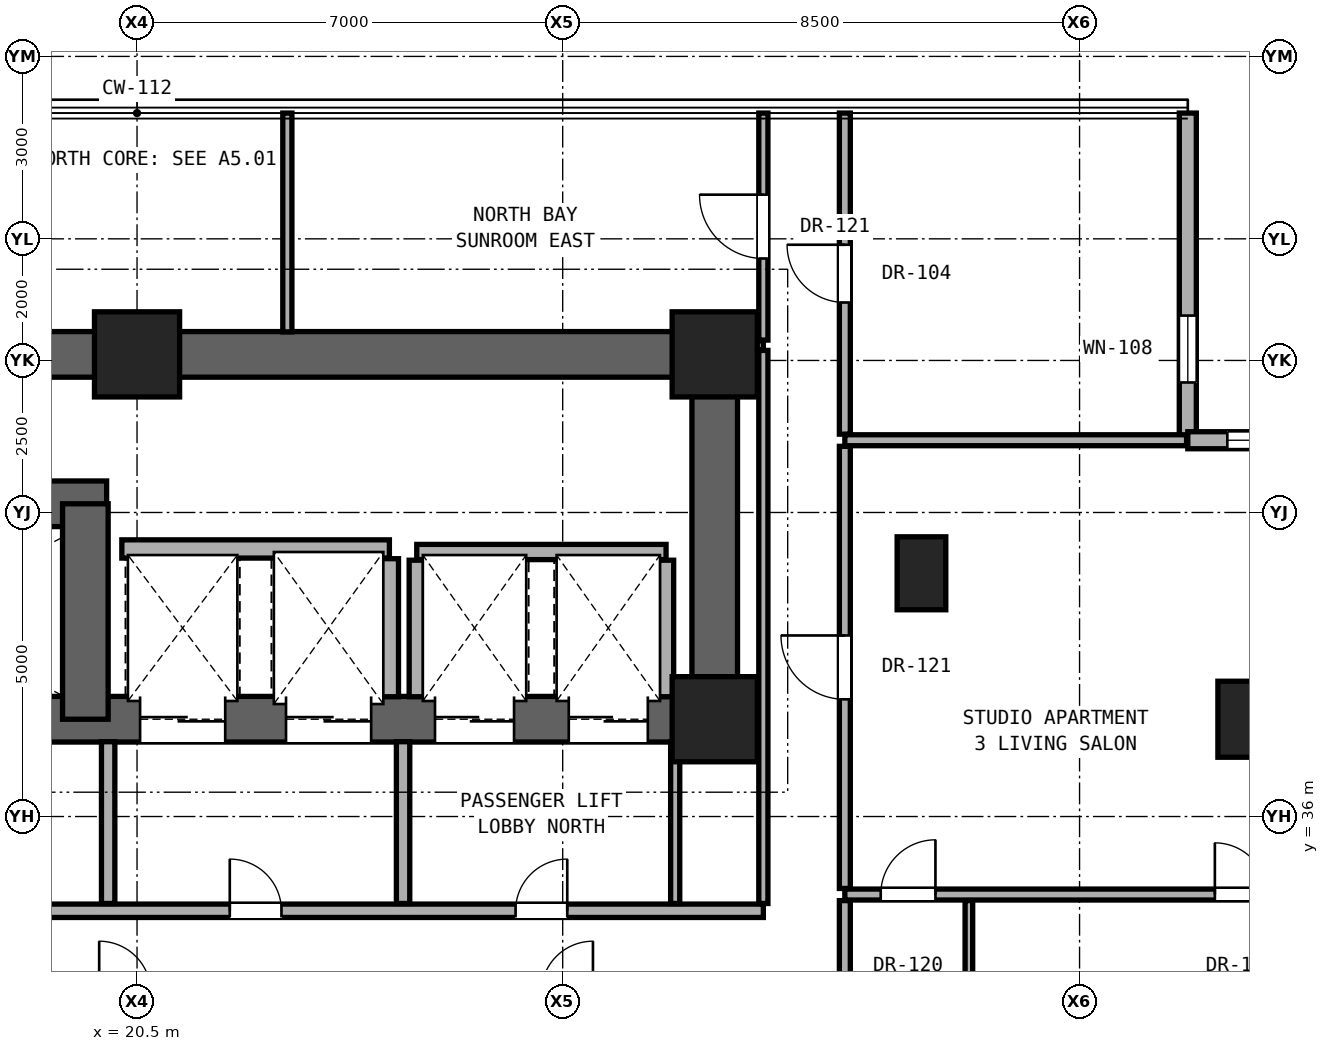
"""IFC4 building model, lengths in metres.
Left out: names, types, materials, properties, quantities, classifications, styles, units other than length and angle.
Written with IfcOpenShell. Run it as: python <this file> out.ifc"""

import sys

from ifc_helpers import new_model, si_unit, direction, frame, frame_2d, origin, origin_2d, place, context, subcontext, project, spatial, rectangle, hollow_rectangle, extrude, element, fill, save


model = new_model("IFC4")
c1 = context("Model", 3, precision=1e-05, world=origin(), true_north=direction((0.0, 1.0)))
c2 = subcontext(c1, "Body", "Model", "MODEL_VIEW")
j1 = project(units=[si_unit("LENGTHUNIT", "METRE"), si_unit("PLANEANGLEUNIT", "RADIAN")], contexts=[c1])
p1 = place(None, origin())
s1 = spatial("IfcSite", under=j1, at=p1, CompositionType="ELEMENT")
p2 = place(p1, origin())
s2 = spatial("IfcBuilding", under=s1, at=p2, CompositionType="ELEMENT")
p3 = place(p2, frame((0.0, 0.0, 42.2)))
s3 = spatial("IfcBuildingStorey", under=s2, at=p3, CompositionType="ELEMENT", Elevation=42.2)
for number, where, z_axis, x_axis in (
    (1, (30.0, 37.6, 0.0), (0.0, 0.0, 1.0), (1.0, 0.0, 0.0)),
    (2, (20.5, 43.6, 0.0), (0.0, 0.0, 1.0), (1.0, 0.0, 0.0)),
    (3, (30.0, 43.6, 0.0), (0.0, 0.0, 1.0), (1.0, 0.0, 0.0)),
):
    element("IfcColumn", number, at=place(p3, frame(where, z_axis=z_axis, x_axis=x_axis)), inside=s3, PredefinedType="COLUMN", context=c2, shape_type="SweptSolid", body=[
        extrude(rectangle(XDim=1.4, YDim=1.4, at=origin_2d()), origin(), (0.0, 0.0, 1.0), 3.3),
    ])
p4 = place(p3, frame((38.9, 37.6, 0.0), z_axis=(0.0, 0.0, 1.0), x_axis=(1.0, 0.0, 0.0)))
e4 = element("IfcColumn", 4, at=p4, inside=s3, PredefinedType="COLUMN", context=c2, shape_type="SweptSolid", body=[
    extrude(hollow_rectangle(XDim=1.25, YDim=1.25, WallThickness=0.07, at=origin_2d()), origin(), (0.0, 0.0, 1.0), 3.3),
])
p5 = place(p3, frame((33.4, 40.0, 0.0), z_axis=(0.0, 0.0, 1.0), x_axis=(1.0, 0.0, 0.0)))
e5 = element("IfcColumn", 5, at=p5, inside=s3, PredefinedType="PILASTER", context=c2, shape_type="SweptSolid", body=[
    extrude(rectangle(XDim=0.8, YDim=1.2, at=origin_2d()), origin(), (0.0, 0.0, 1.0), 3.3),
])
p6 = place(p3, frame((11.0, 43.6, 0.0), z_axis=(0.0, 0.0, 1.0), x_axis=(1.0, 0.0, 0.0)))
e6 = element("IfcWall", 6, at=p6, inside=s3, PredefinedType="SHEAR", context=c2, shape_type="SweptSolid", body=[
    extrude(rectangle(XDim=19.0, YDim=0.75, at=frame_2d((9.5, 0.0))), origin(), (0.0, 0.0, 1.0), 3.06),
])
p7 = place(p3, frame((30.0, 37.6, 0.0), z_axis=(0.0, 0.0, 1.0), x_axis=(0.0, 1.0, 0.0)))
e7 = element("IfcWall", 7, at=p7, inside=s3, PredefinedType="SHEAR", context=c2, shape_type="SweptSolid", body=[
    extrude(rectangle(XDim=6.0, YDim=0.75, at=frame_2d((3.0, 0.0))), origin(), (0.0, 0.0, 1.0), 3.06),
])
p8 = place(p3, frame((11.0, 37.6, 0.0), z_axis=(0.0, 0.0, 1.0), x_axis=(1.0, 0.0, 0.0)))
e8 = element("IfcWall", 8, at=p8, inside=s3, PredefinedType="SHEAR", context=c2, shape_type="SweptSolid", body=[
    extrude(rectangle(XDim=19.0, YDim=0.75, at=frame_2d((9.5, 0.0))), origin(), (0.0, 0.0, 1.0), 3.06),
])
p9 = place(p8, frame((1.06, 0.0, 0.0)))
e9 = element("IfcOpeningElement", 9, at=p9, cuts=e8, PredefinedType="OPENING", context=c2, shape_type="SweptSolid", body=[
    extrude(rectangle(XDim=1.15, YDim=2.2, at=frame_2d((0.575, 1.1))), frame((0.0, 0.385, 0.0), z_axis=(0.0, -1.0, 0.0), x_axis=(1.0, 0.0, 0.0)), (0.0, 0.0, 1.0), 0.77),
])
p10 = place(p8, frame((9.55, 0.0, 0.0)))
e10 = element("IfcOpeningElement", 10, at=p10, cuts=e8, PredefinedType="OPENING", context=c2, shape_type="SweptSolid", body=[
    extrude(rectangle(XDim=1.4, YDim=2.35, at=frame_2d((0.7, 1.175))), frame((0.0, 0.385, 0.0), z_axis=(0.0, -1.0, 0.0), x_axis=(1.0, 0.0, 0.0)), (0.0, 0.0, 1.0), 0.77),
])
p11 = place(p8, frame((11.95, 0.0, 0.0)))
e11 = element("IfcOpeningElement", 11, at=p11, cuts=e8, PredefinedType="OPENING", context=c2, shape_type="SweptSolid", body=[
    extrude(rectangle(XDim=1.4, YDim=2.35, at=frame_2d((0.7, 1.175))), frame((0.0, 0.385, 0.0), z_axis=(0.0, -1.0, 0.0), x_axis=(1.0, 0.0, 0.0)), (0.0, 0.0, 1.0), 0.77),
])
p12 = place(p8, frame((14.4, 0.0, 0.0)))
e12 = element("IfcOpeningElement", 12, at=p12, cuts=e8, PredefinedType="OPENING", context=c2, shape_type="SweptSolid", body=[
    extrude(rectangle(XDim=1.3, YDim=2.3, at=frame_2d((0.65, 1.15))), frame((0.0, 0.385, 0.0), z_axis=(0.0, -1.0, 0.0), x_axis=(1.0, 0.0, 0.0)), (0.0, 0.0, 1.0), 0.77),
])
p13 = place(p8, frame((16.6, 0.0, 0.0)))
e13 = element("IfcOpeningElement", 13, at=p13, cuts=e8, PredefinedType="OPENING", context=c2, shape_type="SweptSolid", body=[
    extrude(rectangle(XDim=1.3, YDim=2.3, at=frame_2d((0.65, 1.15))), frame((0.0, 0.385, 0.0), z_axis=(0.0, -1.0, 0.0), x_axis=(1.0, 0.0, 0.0)), (0.0, 0.0, 1.0), 0.77),
])
p14 = place(p3, frame((11.0, 41.143, 0.0), z_axis=(0.0, 0.0, 1.0), x_axis=(1.0, 0.0, 0.0)))
e14 = element("IfcWall", 14, at=p14, inside=s3, PredefinedType="SHEAR", context=c2, shape_type="SweptSolid", body=[
    extrude(rectangle(XDim=9.0, YDim=0.75, at=frame_2d((4.5, 0.0))), origin(), (0.0, 0.0, 1.0), 3.06),
])
p15 = place(p3, frame((19.65, 37.6, 0.0), z_axis=(0.0, 0.0, 1.0), x_axis=(0.0, 1.0, 0.0)))
e15 = element("IfcWall", 15, at=p15, inside=s3, PredefinedType="SHEAR", context=c2, shape_type="SweptSolid", body=[
    extrude(rectangle(XDim=3.543, YDim=0.75, at=frame_2d((1.771, 0.0))), origin(), (0.0, 0.0, 1.0), 3.06),
])
p16 = place(p3, frame((37.78, 42.188, 0.0), z_axis=(0.0, 0.0, 1.0), x_axis=(0.0, 1.0, 0.0)))
e16 = element("IfcWall", 16, at=p16, inside=s3, PredefinedType="SOLIDWALL", context=c2, shape_type="SweptSolid", body=[
    extrude(rectangle(XDim=5.38, YDim=0.28, at=frame_2d((2.69, 0.0))), origin(), (0.0, 0.0, 1.0), 3.04),
])
p17 = place(p16, frame((0.95, 0.0, 0.85)))
e17 = element("IfcOpeningElement", 17, at=p17, cuts=e16, PredefinedType="OPENING", context=c2, shape_type="SweptSolid", body=[
    extrude(rectangle(XDim=1.1, YDim=2.0, at=frame_2d((0.55, 1.0))), frame((0.0, 0.15, 0.0), z_axis=(0.0, -1.0, 0.0), x_axis=(1.0, 0.0, 0.0)), (0.0, 0.0, 1.0), 0.3),
])
p18 = place(p3, frame((43.16, 42.188, 0.0), z_axis=(0.0, 0.0, 1.0), x_axis=(-1.0, 0.0, 0.0)))
e18 = element("IfcWall", 18, at=p18, inside=s3, PredefinedType="SOLIDWALL", context=c2, shape_type="SweptSolid", body=[
    extrude(rectangle(XDim=5.38, YDim=0.28, at=frame_2d((2.69, 0.0))), origin(), (0.0, 0.0, 1.0), 3.04),
])
p19 = place(p18, frame((3.63, 0.0, 0.85)))
e19 = element("IfcOpeningElement", 19, at=p19, cuts=e18, PredefinedType="OPENING", context=c2, shape_type="SweptSolid", body=[
    extrude(rectangle(XDim=1.1, YDim=2.0, at=frame_2d((0.55, 1.0))), frame((0.0, 0.15, 0.0), z_axis=(0.0, -1.0, 0.0), x_axis=(1.0, 0.0, 0.0)), (0.0, 0.0, 1.0), 0.3),
])
p20 = place(p3, frame((15.59, 34.45, 0.0), z_axis=(0.0, 0.0, 1.0), x_axis=(1.0, 0.0, 0.0)))
e20 = element("IfcWall", 20, at=p20, inside=s3, PredefinedType="SOLIDWALL", context=c2, shape_type="SweptSolid", body=[
    extrude(rectangle(XDim=15.21, YDim=0.22, at=frame_2d((7.605, 0.0))), origin(), (0.0, 0.0, 1.0), 2.104),
])
p21 = place(p20, frame((6.435, 0.0, 0.0)))
e21 = element("IfcOpeningElement", 21, at=p21, cuts=e20, PredefinedType="OPENING", context=c2, shape_type="SweptSolid", body=[
    extrude(rectangle(XDim=0.85, YDim=2.01, at=frame_2d((0.425, 1.005))), frame((0.0, 0.12, 0.0), z_axis=(0.0, -1.0, 0.0), x_axis=(1.0, 0.0, 0.0)), (0.0, 0.0, 1.0), 0.24),
])
p22 = place(p20, frame((11.135, 0.0, 0.0)))
e22 = element("IfcOpeningElement", 22, at=p22, cuts=e20, PredefinedType="OPENING", context=c2, shape_type="SweptSolid", body=[
    extrude(rectangle(XDim=0.85, YDim=2.01, at=frame_2d((0.425, 1.005))), frame((0.0, 0.12, 0.0), z_axis=(0.0, -1.0, 0.0), x_axis=(1.0, 0.0, 0.0)), (0.0, 0.0, 1.0), 0.24),
])
p23 = place(p20, frame((1.775, 0.0, 0.0)))
e23 = element("IfcOpeningElement", 23, at=p23, cuts=e20, PredefinedType="OPENING", context=c2, shape_type="SweptSolid", body=[
    extrude(rectangle(XDim=0.85, YDim=2.01, at=frame_2d((0.425, 1.005))), frame((0.0, 0.12, 0.0), z_axis=(0.0, -1.0, 0.0), x_axis=(1.0, 0.0, 0.0)), (0.0, 0.0, 1.0), 0.24),
])
p24 = place(p3, frame((32.14, 34.717, 0.0), z_axis=(0.0, 0.0, 1.0), x_axis=(1.0, 0.0, 0.0)))
e24 = element("IfcWall", 24, at=p24, inside=s3, PredefinedType="PARTITIONING", context=c2, shape_type="SweptSolid", body=[
    extrude(rectangle(XDim=11.02, YDim=0.18, at=frame_2d((5.51, 0.0))), origin(), (0.0, 0.0, 1.0), 2.125),
])
p25 = place(p24, frame((6.085, 0.0, 0.0)))
e25 = element("IfcOpeningElement", 25, at=p25, cuts=e24, PredefinedType="OPENING", context=c2, shape_type="SweptSolid", body=[
    extrude(rectangle(XDim=0.85, YDim=2.01, at=frame_2d((0.425, 1.005))), frame((0.0, 0.1, 0.0), z_axis=(0.0, -1.0, 0.0), x_axis=(1.0, 0.0, 0.0)), (0.0, 0.0, 1.0), 0.2),
])
p26 = place(p24, frame((0.59, 0.0, 0.0)))
e26 = element("IfcOpeningElement", 26, at=p26, cuts=e24, PredefinedType="OPENING", context=c2, shape_type="SweptSolid", body=[
    extrude(rectangle(XDim=0.9, YDim=2.1, at=frame_2d((0.45, 1.05))), frame((0.0, 0.1, 0.0), z_axis=(0.0, -1.0, 0.0), x_axis=(1.0, 0.0, 0.0)), (0.0, 0.0, 1.0), 0.2),
])
p27 = place(p3, frame((25.1, 40.35, 0.0), z_axis=(0.0, 0.0, 1.0), x_axis=(1.0, 0.0, 0.0)))
e27 = element("IfcWall", 27, at=p27, inside=s3, PredefinedType="SOLIDWALL", context=c2, shape_type="SweptSolid", body=[
    extrude(rectangle(XDim=4.1, YDim=0.25, at=frame_2d((2.05, 0.0))), origin(), (0.0, 0.0, 1.0), 3.06),
])
p28 = place(p3, frame((20.25, 40.4, 0.0), z_axis=(0.0, 0.0, 1.0), x_axis=(1.0, 0.0, 0.0)))
e28 = element("IfcWall", 28, at=p28, inside=s3, PredefinedType="SOLIDWALL", context=c2, shape_type="SweptSolid", body=[
    extrude(rectangle(XDim=4.4, YDim=0.3, at=frame_2d((2.2, 0.0))), origin(), (0.0, 0.0, 1.0), 3.06),
])
p29 = place(p3, frame((32.14, 42.188, 0.0), z_axis=(0.0, 0.0, 1.0), x_axis=(1.0, 0.0, 0.0)))
e29 = element("IfcWall", 29, at=p29, inside=s3, PredefinedType="PARTITIONING", context=c2, shape_type="SweptSolid", body=[
    extrude(rectangle(XDim=5.62, YDim=0.18, at=frame_2d((2.81, 0.0))), origin(), (0.0, 0.0, 1.0), 3.06),
])
p30 = place(p3, frame((30.37, 43.75, 0.0), z_axis=(0.0, 0.0, 1.0), x_axis=(1.0, 0.0, 0.0)))
e30 = element("IfcWall", 30, at=p30, inside=s3, PredefinedType="PARTITIONING", context=c2, shape_type="SweptSolid", body=[
    extrude(rectangle(XDim=0.43, YDim=0.15, at=frame_2d((0.215, 0.0))), origin(), (0.0, 0.0, 1.0), 3.06),
])
p31 = place(p3, frame((20.025, 34.57, 0.0), z_axis=(0.0, 0.0, 1.0), x_axis=(0.0, 1.0, 0.0)))
e31 = element("IfcWall", 31, at=p31, inside=s3, PredefinedType="SOLIDWALL", context=c2, shape_type="SweptSolid", body=[
    extrude(rectangle(XDim=2.66, YDim=0.22, at=frame_2d((1.33, 0.0))), origin(), (0.0, 0.0, 1.0), 3.06),
])
p32 = place(p3, frame((22.972, 43.97, 0.0), z_axis=(0.0, 0.0, 1.0), x_axis=(0.0, 1.0, 0.0)))
e32 = element("IfcWall", 32, at=p32, inside=s3, PredefinedType="PARTITIONING", context=c2, shape_type="SweptSolid", body=[
    extrude(rectangle(XDim=3.598, YDim=0.15, at=frame_2d((1.799, 0.0))), origin(), (0.0, 0.0, 1.0), 3.06),
])
p33 = place(p3, frame((24.65, 37.97, 0.0), z_axis=(0.0, 0.0, 1.0), x_axis=(0.0, 1.0, 0.0)))
e33 = element("IfcWall", 33, at=p33, inside=s3, PredefinedType="SOLIDWALL", context=c2, shape_type="SweptSolid", body=[
    extrude(rectangle(XDim=2.27, YDim=0.3, at=frame_2d((1.135, 0.0))), origin(), (0.0, 0.0, 1.0), 3.06),
])
p34 = place(p3, frame((24.875, 34.57, 0.0), z_axis=(0.0, 0.0, 1.0), x_axis=(0.0, 1.0, 0.0)))
e34 = element("IfcWall", 34, at=p34, inside=s3, PredefinedType="SOLIDWALL", context=c2, shape_type="SweptSolid", body=[
    extrude(rectangle(XDim=2.66, YDim=0.22, at=frame_2d((1.33, 0.0))), origin(), (0.0, 0.0, 1.0), 3.06),
])
p35 = place(p3, frame((25.1, 37.97, 0.0), z_axis=(0.0, 0.0, 1.0), x_axis=(0.0, 1.0, 0.0)))
e35 = element("IfcWall", 35, at=p35, inside=s3, PredefinedType="SOLIDWALL", context=c2, shape_type="SweptSolid", body=[
    extrude(rectangle(XDim=2.245, YDim=0.25, at=frame_2d((1.123, 0.0))), origin(), (0.0, 0.0, 1.0), 3.06),
])
p36 = place(p3, frame((29.35, 34.57, 0.0), z_axis=(0.0, 0.0, 1.0), x_axis=(0.0, 1.0, 0.0)))
e36 = element("IfcWall", 36, at=p36, inside=s3, PredefinedType="PARTITIONING", context=c2, shape_type="SweptSolid", body=[
    extrude(rectangle(XDim=2.66, YDim=0.15, at=frame_2d((1.33, 0.0))), origin(), (0.0, 0.0, 1.0), 3.06),
])
p37 = place(p3, frame((29.2, 37.97, 0.0), z_axis=(0.0, 0.0, 1.0), x_axis=(0.0, 1.0, 0.0)))
e37 = element("IfcWall", 37, at=p37, inside=s3, PredefinedType="SOLIDWALL", context=c2, shape_type="SweptSolid", body=[
    extrude(rectangle(XDim=2.245, YDim=0.25, at=frame_2d((1.123, 0.0))), origin(), (0.0, 0.0, 1.0), 3.06),
])
p38 = place(p3, frame((30.8, 34.57, 0.0), z_axis=(0.0, 0.0, 1.0), x_axis=(0.0, 1.0, 0.0)))
e38 = element("IfcWall", 38, at=p38, inside=s3, PredefinedType="PARTITIONING", context=c2, shape_type="SweptSolid", body=[
    extrude(rectangle(XDim=9.095, YDim=0.15, at=frame_2d((4.547, 0.0))), origin(), (0.0, 0.0, 1.0), 2.436),
])
p39 = place(p3, frame((30.8, 43.835, 0.0), z_axis=(0.0, 0.0, 1.0), x_axis=(0.0, 1.0, 0.0)))
e39 = element("IfcWall", 39, at=p39, inside=s3, PredefinedType="PARTITIONING", context=c2, shape_type="SweptSolid", body=[
    extrude(rectangle(XDim=3.733, YDim=0.15, at=frame_2d((1.867, 0.0))), origin(), (0.0, 0.0, 1.0), 3.06),
])
p40 = place(p39, frame((1.342, 0.0, 0.0)))
e40 = element("IfcOpeningElement", 40, at=p40, cuts=e39, PredefinedType="OPENING", context=c2, shape_type="SweptSolid", body=[
    extrude(rectangle(XDim=1.05, YDim=2.2, at=frame_2d((0.525, 1.1))), frame((0.0, 0.085, 0.0), z_axis=(0.0, -1.0, 0.0), x_axis=(1.0, 0.0, 0.0)), (0.0, 0.0, 1.0), 0.17),
])
p41 = place(p3, frame((32.14, 32.517, 0.0), z_axis=(0.0, 0.0, 1.0), x_axis=(0.0, 1.0, 0.0)))
e41 = element("IfcWall", 41, at=p41, inside=s3, PredefinedType="PARTITIONING", context=c2, shape_type="SweptSolid", body=[
    extrude(rectangle(XDim=2.1, YDim=0.18, at=frame_2d((1.05, 0.0))), origin(), (0.0, 0.0, 1.0), 3.06),
])
p42 = place(p3, frame((32.14, 34.817, 0.0), z_axis=(0.0, 0.0, 1.0), x_axis=(0.0, 1.0, 0.0)))
e42 = element("IfcWall", 42, at=p42, inside=s3, PredefinedType="PARTITIONING", context=c2, shape_type="SweptSolid", body=[
    extrude(rectangle(XDim=7.271, YDim=0.18, at=frame_2d((3.635, 0.0))), origin(), (0.0, 0.0, 1.0), 2.436),
])
p43 = place(p42, frame((3.111, 0.0, 0.0)))
e43 = element("IfcOpeningElement", 43, at=p43, cuts=e42, PredefinedType="OPENING", context=c2, shape_type="SweptSolid", body=[
    extrude(rectangle(XDim=1.05, YDim=2.2, at=frame_2d((0.525, 1.1))), frame((0.0, 0.1, 0.0), z_axis=(0.0, -1.0, 0.0), x_axis=(1.0, 0.0, 0.0)), (0.0, 0.0, 1.0), 0.2),
])
p44 = place(p3, frame((32.14, 42.288, 0.0), z_axis=(0.0, 0.0, 1.0), x_axis=(0.0, 1.0, 0.0)))
e44 = element("IfcWall", 44, at=p44, inside=s3, PredefinedType="PARTITIONING", context=c2, shape_type="SweptSolid", body=[
    extrude(rectangle(XDim=5.28, YDim=0.18, at=frame_2d((2.64, 0.0))), origin(), (0.0, 0.0, 1.0), 3.06),
])
p45 = place(p44, frame((2.165, 0.0, 0.0)))
e45 = element("IfcOpeningElement", 45, at=p45, cuts=e44, PredefinedType="OPENING", context=c2, shape_type="SweptSolid", body=[
    extrude(rectangle(XDim=0.95, YDim=2.15, at=frame_2d((0.475, 1.075))), frame((0.0, 0.1, 0.0), z_axis=(0.0, -1.0, 0.0), x_axis=(1.0, 0.0, 0.0)), (0.0, 0.0, 1.0), 0.2),
])
p46 = place(p3, frame((34.18, 32.517, 0.0), z_axis=(0.0, 0.0, 1.0), x_axis=(0.0, 1.0, 0.0)))
e46 = element("IfcWall", 46, at=p46, inside=s3, PredefinedType="PARTITIONING", context=c2, shape_type="SweptSolid", body=[
    extrude(rectangle(XDim=2.1, YDim=0.125, at=frame_2d((1.05, 0.0))), origin(), (0.0, 0.0, 1.0), 3.06),
])
p47 = place(p17, origin())
e47 = element("IfcWindow", 47, at=p47, inside=s3, PartitioningType="SINGLE_PANEL", PredefinedType="WINDOW", context=c2, shape_type="SweptSolid", body=[
    extrude(rectangle(XDim=1.1, YDim=2.0, at=frame_2d((0.55, 1.0))), frame((0.0, 0.03, 0.0), z_axis=(0.0, -1.0, 0.0), x_axis=(1.0, 0.0, 0.0)), (0.0, 0.0, 1.0), 0.06),
])
fill(e17, e47)
p48 = place(p19, origin())
e48 = element("IfcWindow", 48, at=p48, inside=s3, PartitioningType="SINGLE_PANEL", PredefinedType="WINDOW", context=c2, shape_type="SweptSolid", body=[
    extrude(rectangle(XDim=1.1, YDim=2.0, at=frame_2d((0.55, 1.0))), frame((0.0, 0.03, 0.0), z_axis=(0.0, -1.0, 0.0), x_axis=(1.0, 0.0, 0.0)), (0.0, 0.0, 1.0), 0.06),
])
fill(e19, e48)
p49 = place(p21, origin())
e49 = element("IfcDoor", 49, at=p49, inside=s3, OperationType="SINGLE_SWING_LEFT", PredefinedType="DOOR", context=c2, shape_type="SweptSolid", body=[
    extrude(rectangle(XDim=0.85, YDim=2.01, at=frame_2d((0.425, 1.005))), frame((0.0, 0.025, 0.0), z_axis=(0.0, -1.0, 0.0), x_axis=(1.0, 0.0, 0.0)), (0.0, 0.0, 1.0), 0.05),
])
fill(e21, e49)
p50 = place(p22, origin())
e50 = element("IfcDoor", 50, at=p50, inside=s3, OperationType="SINGLE_SWING_RIGHT", PredefinedType="DOOR", context=c2, shape_type="SweptSolid", body=[
    extrude(rectangle(XDim=0.85, YDim=2.01, at=frame_2d((0.425, 1.005))), frame((0.0, 0.025, 0.0), z_axis=(0.0, -1.0, 0.0), x_axis=(1.0, 0.0, 0.0)), (0.0, 0.0, 1.0), 0.05),
])
fill(e22, e50)
p51 = place(p43, origin())
e51 = element("IfcDoor", 51, at=p51, inside=s3, OperationType="SINGLE_SWING_RIGHT", PredefinedType="DOOR", context=c2, shape_type="SweptSolid", body=[
    extrude(rectangle(XDim=1.05, YDim=2.2, at=frame_2d((0.525, 1.1))), frame((0.0, 0.025, 0.0), z_axis=(0.0, -1.0, 0.0), x_axis=(1.0, 0.0, 0.0)), (0.0, 0.0, 1.0), 0.05),
])
fill(e43, e51)
p52 = place(p25, origin())
e52 = element("IfcDoor", 52, at=p52, inside=s3, OperationType="SINGLE_SWING_LEFT", PredefinedType="DOOR", context=c2, shape_type="SweptSolid", body=[
    extrude(rectangle(XDim=0.85, YDim=2.01, at=frame_2d((0.425, 1.005))), frame((0.0, 0.025, 0.0), z_axis=(0.0, -1.0, 0.0), x_axis=(1.0, 0.0, 0.0)), (0.0, 0.0, 1.0), 0.05),
])
fill(e25, e52)
p53 = place(p26, origin())
e53 = element("IfcDoor", 53, at=p53, inside=s3, OperationType="SINGLE_SWING_RIGHT", PredefinedType="DOOR", context=c2, shape_type="SweptSolid", body=[
    extrude(rectangle(XDim=0.9, YDim=2.1, at=frame_2d((0.45, 1.05))), frame((0.0, 0.025, 0.0), z_axis=(0.0, -1.0, 0.0), x_axis=(1.0, 0.0, 0.0)), (0.0, 0.0, 1.0), 0.05),
])
fill(e26, e53)
p54 = place(p40, origin())
e54 = element("IfcDoor", 54, at=p54, inside=s3, OperationType="SINGLE_SWING_RIGHT", PredefinedType="DOOR", context=c2, shape_type="SweptSolid", body=[
    extrude(rectangle(XDim=1.05, YDim=2.2, at=frame_2d((0.525, 1.1))), frame((0.0, 0.025, 0.0), z_axis=(0.0, -1.0, 0.0), x_axis=(1.0, 0.0, 0.0)), (0.0, 0.0, 1.0), 0.05),
])
fill(e40, e54)
p55 = place(p45, origin())
e55 = element("IfcDoor", 55, at=p55, inside=s3, OperationType="SINGLE_SWING_RIGHT", PredefinedType="DOOR", context=c2, shape_type="SweptSolid", body=[
    extrude(rectangle(XDim=0.95, YDim=2.15, at=frame_2d((0.475, 1.075))), frame((0.0, 0.025, 0.0), z_axis=(0.0, -1.0, 0.0), x_axis=(1.0, 0.0, 0.0)), (0.0, 0.0, 1.0), 0.05),
])
fill(e45, e55)
p56 = place(p10, origin())
e56 = element("IfcDoor", 56, at=p56, inside=s3, OperationType="DOUBLE_DOOR_SLIDING", PredefinedType="DOOR", context=c2, shape_type="SweptSolid", body=[
    extrude(rectangle(XDim=1.4, YDim=2.35, at=frame_2d((0.7, 1.175))), frame((0.0, 0.025, 0.0), z_axis=(0.0, -1.0, 0.0), x_axis=(1.0, 0.0, 0.0)), (0.0, 0.0, 1.0), 0.05),
])
fill(e10, e56)
p57 = place(p11, origin())
e57 = element("IfcDoor", 57, at=p57, inside=s3, OperationType="DOUBLE_DOOR_SLIDING", PredefinedType="DOOR", context=c2, shape_type="SweptSolid", body=[
    extrude(rectangle(XDim=1.4, YDim=2.35, at=frame_2d((0.7, 1.175))), frame((0.0, 0.025, 0.0), z_axis=(0.0, -1.0, 0.0), x_axis=(1.0, 0.0, 0.0)), (0.0, 0.0, 1.0), 0.05),
])
fill(e11, e57)
p58 = place(p12, origin())
e58 = element("IfcDoor", 58, at=p58, inside=s3, OperationType="DOUBLE_DOOR_SLIDING", PredefinedType="DOOR", context=c2, shape_type="SweptSolid", body=[
    extrude(rectangle(XDim=1.3, YDim=2.3, at=frame_2d((0.65, 1.15))), frame((0.0, 0.025, 0.0), z_axis=(0.0, -1.0, 0.0), x_axis=(1.0, 0.0, 0.0)), (0.0, 0.0, 1.0), 0.05),
])
fill(e12, e58)
p59 = place(p13, origin())
e59 = element("IfcDoor", 59, at=p59, inside=s3, OperationType="DOUBLE_DOOR_SLIDING", PredefinedType="DOOR", context=c2, shape_type="SweptSolid", body=[
    extrude(rectangle(XDim=1.3, YDim=2.3, at=frame_2d((0.65, 1.15))), frame((0.0, 0.025, 0.0), z_axis=(0.0, -1.0, 0.0), x_axis=(1.0, 0.0, 0.0)), (0.0, 0.0, 1.0), 0.05),
])
fill(e13, e59)
save(model, sys.argv[1])
